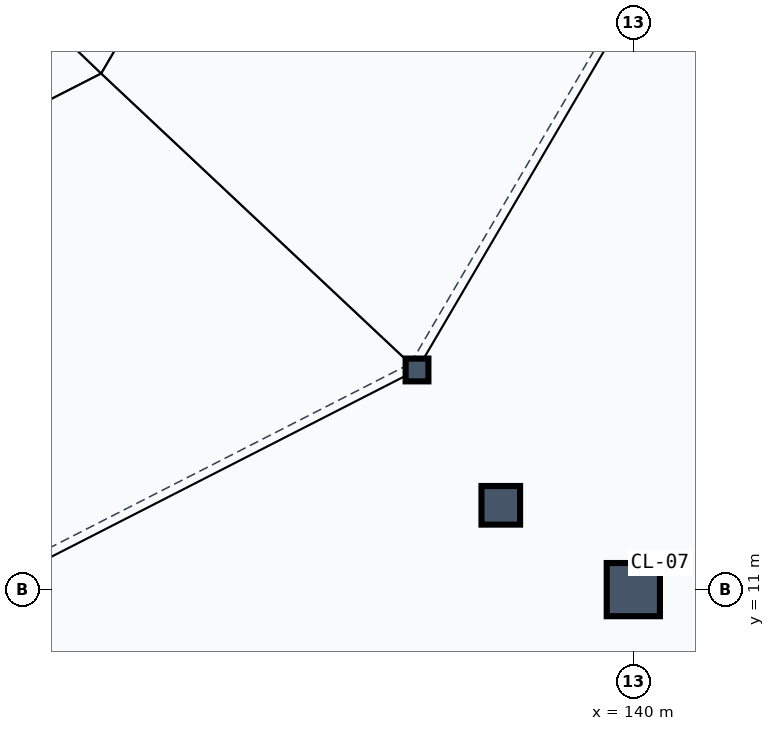
"""IFC4 building model, lengths in metres.
Left out: names, types, materials, properties, quantities, classifications, styles, units other than length and angle.
Written with IfcOpenShell. Run it as: python <this file> out.ifc"""

import sys

from ifc_helpers import new_model, si_unit, direction, frame, origin, origin_2d, place, context, subcontext, project, spatial, rectangle, hollow_rectangle, hollow_circle, extrude, element, save


model = new_model("IFC4")
c1 = context("Model", 3, precision=1e-05, world=origin(), true_north=direction((0.0, 1.0)))
c2 = subcontext(c1, "Body", "Model", "MODEL_VIEW")
j1 = project(units=[si_unit("LENGTHUNIT", "METRE"), si_unit("PLANEANGLEUNIT", "RADIAN")], contexts=[c1])
p1 = place(None, origin())
s1 = spatial("IfcSite", under=j1, at=p1, CompositionType="ELEMENT")
p2 = place(p1, origin())
s2 = spatial("IfcBuilding", under=s1, at=p2, CompositionType="ELEMENT")
p3 = place(p2, frame((0.0, 0.0, 14.7)))
s3 = spatial("IfcBuildingStorey", under=s2, at=p3, CompositionType="ELEMENT", Elevation=14.7)
p4 = place(p3, frame((140.0, 11.0, 0.0), z_axis=(0.0, 0.0, 1.0), x_axis=(1.0, 0.0, 0.0)))
e1 = element("IfcColumn", 1, at=p4, inside=s3, PredefinedType="COLUMN", context=c2, shape_type="SweptSolid", body=[
    extrude(rectangle(XDim=0.7, YDim=0.7, at=origin_2d()), origin(), (0.0, 0.0, 1.0), 4.8),
])
p5 = place(p3, frame((138.256, 12.109, 0.0), z_axis=(0.0, 0.0, 1.0), x_axis=(1.0, 0.0, 0.0)))
e2 = element("IfcColumn", 2, at=p5, inside=s3, PredefinedType="COLUMN", context=c2, shape_type="SweptSolid", body=[
    extrude(hollow_circle(Radius=0.254, WallThickness=0.02, at=origin_2d()), origin(), (0.0, 0.0, 1.0), 4.8),
])
p6 = place(p3, frame((137.154, 13.89, 0.0), z_axis=(0.0, 0.0, 1.0), x_axis=(1.0, 0.0, 0.0)))
e3 = element("IfcColumn", 3, at=p6, inside=s3, PredefinedType="COLUMN", context=c2, shape_type="SweptSolid", body=[
    extrude(hollow_rectangle(XDim=0.3, YDim=0.3, WallThickness=0.016, at=origin_2d()), origin(), (0.0, 0.0, 1.0), 1.22),
])
save(model, sys.argv[1])
